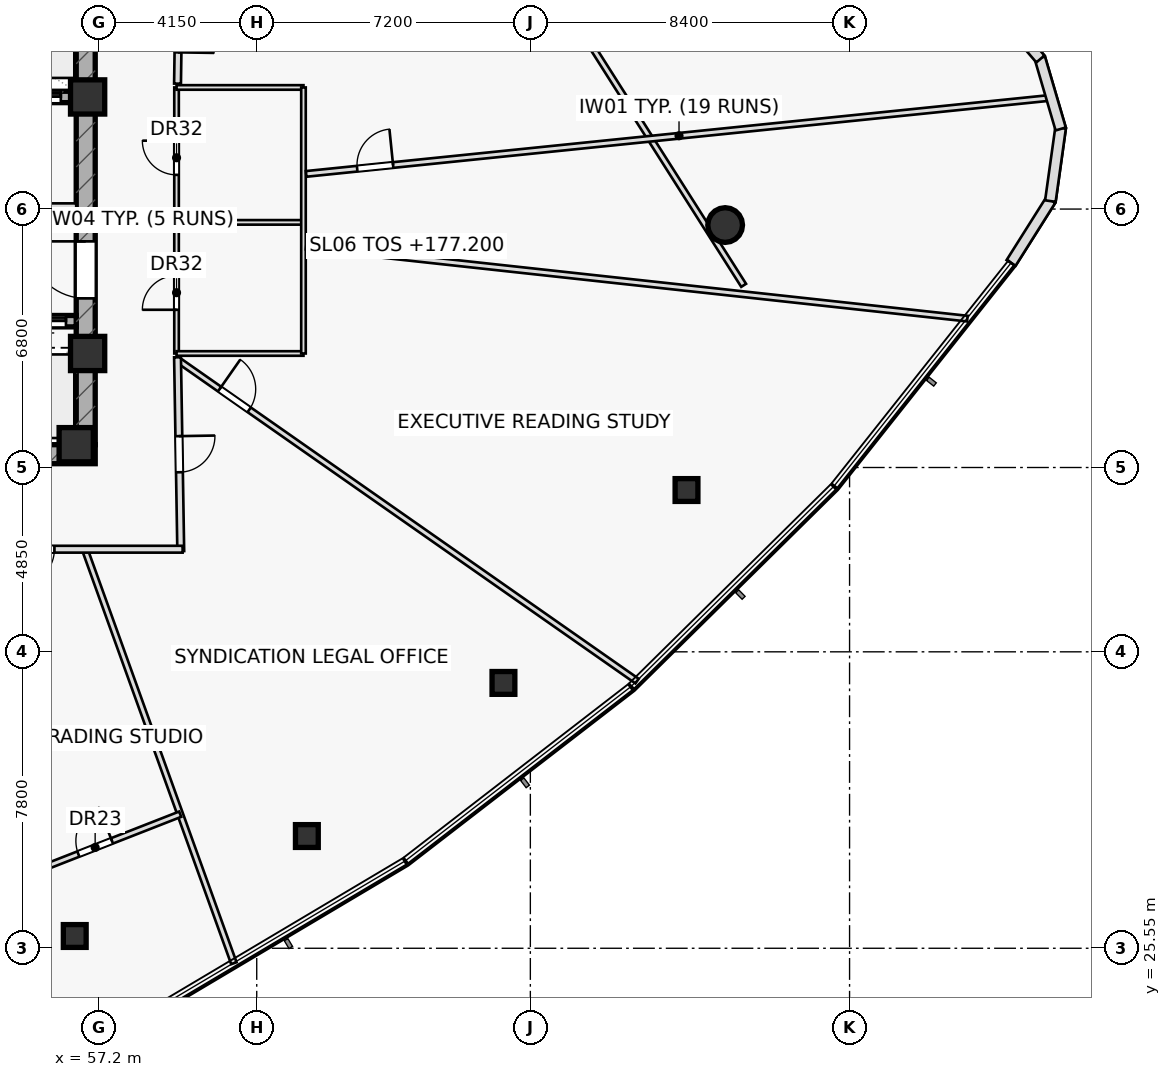
"""IFC4 building model, lengths in metres.
Left out: names, types, materials, properties, quantities, classifications, styles, units other than length and angle.
Written with IfcOpenShell. Run it as: python <this file> out.ifc"""

import sys

from ifc_helpers import new_model, si_unit, direction, frame, frame_2d, origin, origin_2d, place, context, subcontext, project, spatial, rectangle, hollow_rectangle, hollow_circle, extrude, element, fill, save


model = new_model("IFC4")
c1 = context("Model", 3, precision=1e-05, world=origin(), true_north=direction((0.0, 1.0)))
c2 = subcontext(c1, "Body", "Model", "MODEL_VIEW")
j1 = project(units=[si_unit("LENGTHUNIT", "METRE"), si_unit("PLANEANGLEUNIT", "RADIAN")], contexts=[c1])
p1 = place(None, origin())
s1 = spatial("IfcSite", under=j1, at=p1, CompositionType="ELEMENT")
p2 = place(p1, origin())
s2 = spatial("IfcBuilding", under=s1, at=p2, CompositionType="ELEMENT")
p3 = place(p2, frame((0.0, 0.0, 177.2)))
s3 = spatial("IfcBuildingStorey", under=s2, at=p3, CompositionType="ELEMENT", Elevation=177.2)
p4 = place(p3, frame((42.9, 38.55, 0.0), z_axis=(0.0, 0.0, 1.0), x_axis=(1.0, 0.0, 0.0)))
e1 = element("IfcWall", 1, at=p4, inside=s3, PredefinedType="SHEAR", context=c2, shape_type="SweptSolid", body=[
    extrude(rectangle(XDim=14.2, YDim=0.5, at=frame_2d((7.1, 0.0))), origin(), (0.0, 0.0, 1.0), 3.55),
])
p5 = place(p4, frame((0.78, 0.0, 0.0)))
e2 = element("IfcOpeningElement", 2, at=p5, cuts=e1, PredefinedType="OPENING", context=c2, shape_type="SweptSolid", body=[
    extrude(rectangle(XDim=1.05, YDim=2.2, at=frame_2d((0.525, 1.1))), frame((0.0, 0.26, 0.0), z_axis=(0.0, -1.0, 0.0), x_axis=(1.0, 0.0, 0.0)), (0.0, 0.0, 1.0), 0.52),
])
p6 = place(p3, frame((56.85, 38.8, 0.0), z_axis=(0.0, 0.0, 1.0), x_axis=(0.0, 1.0, 0.0)))
e3 = element("IfcWall", 3, at=p6, inside=s3, PredefinedType="SHEAR", context=c2, shape_type="SweptSolid", body=[
    extrude(rectangle(XDim=12.4, YDim=0.5, at=frame_2d((6.2, 0.0))), origin(), (0.0, 0.0, 1.0), 3.55),
])
p7 = place(p6, frame((3.85, 0.0, 0.0)))
e4 = element("IfcOpeningElement", 4, at=p7, cuts=e3, PredefinedType="OPENING", context=c2, shape_type="SweptSolid", body=[
    extrude(rectangle(XDim=1.5, YDim=2.2, at=frame_2d((0.75, 1.1))), frame((0.0, 0.26, 0.0), z_axis=(0.0, -1.0, 0.0), x_axis=(1.0, 0.0, 0.0)), (0.0, 0.0, 1.0), 0.52),
])
p8 = place(p3, frame((43.4, 47.95, 0.0), z_axis=(0.0, 0.0, 1.0), x_axis=(1.0, 0.0, 0.0)))
e5 = element("IfcWall", 5, at=p8, inside=s3, PredefinedType="SHEAR", context=c2, shape_type="SweptSolid", body=[
    extrude(rectangle(XDim=13.2, YDim=0.3, at=frame_2d((6.6, 0.0))), origin(), (0.0, 0.0, 1.0), 3.55),
])
p9 = place(p8, frame((8.345, 0.0, 0.0)))
e6 = element("IfcOpeningElement", 6, at=p9, cuts=e5, PredefinedType="OPENING", context=c2, shape_type="SweptSolid", body=[
    extrude(rectangle(XDim=1.15, YDim=2.2, at=frame_2d((0.575, 1.1))), frame((0.0, 0.16, 0.0), z_axis=(0.0, -1.0, 0.0), x_axis=(1.0, 0.0, 0.0)), (0.0, 0.0, 1.0), 0.32),
])
p10 = place(p8, frame((10.065, 0.0, 0.0)))
e7 = element("IfcOpeningElement", 7, at=p10, cuts=e5, PredefinedType="OPENING", context=c2, shape_type="SweptSolid", body=[
    extrude(rectangle(XDim=1.15, YDim=2.2, at=frame_2d((0.575, 1.1))), frame((0.0, 0.16, 0.0), z_axis=(0.0, -1.0, 0.0), x_axis=(1.0, 0.0, 0.0)), (0.0, 0.0, 1.0), 0.32),
])
p11 = place(p8, frame((11.645, 0.0, 0.0)))
e8 = element("IfcOpeningElement", 8, at=p11, cuts=e5, PredefinedType="OPENING", context=c2, shape_type="SweptSolid", body=[
    extrude(rectangle(XDim=1.15, YDim=2.2, at=frame_2d((0.575, 1.1))), frame((0.0, 0.16, 0.0), z_axis=(0.0, -1.0, 0.0), x_axis=(1.0, 0.0, 0.0)), (0.0, 0.0, 1.0), 0.32),
])
p12 = place(p3, frame((43.4, 42.05, 0.0), z_axis=(0.0, 0.0, 1.0), x_axis=(1.0, 0.0, 0.0)))
e9 = element("IfcWall", 9, at=p12, inside=s3, PredefinedType="SHEAR", context=c2, shape_type="SweptSolid", body=[
    extrude(rectangle(XDim=13.2, YDim=0.3, at=frame_2d((6.6, 0.0))), origin(), (0.0, 0.0, 1.0), 3.55),
])
p13 = place(p12, frame((8.37, 0.0, 0.0)))
e10 = element("IfcOpeningElement", 10, at=p13, cuts=e9, PredefinedType="OPENING", context=c2, shape_type="SweptSolid", body=[
    extrude(rectangle(XDim=1.1, YDim=2.15, at=frame_2d((0.55, 1.075))), frame((0.0, 0.16, 0.0), z_axis=(0.0, -1.0, 0.0), x_axis=(1.0, 0.0, 0.0)), (0.0, 0.0, 1.0), 0.32),
])
p14 = place(p12, frame((10.09, 0.0, 0.0)))
e11 = element("IfcOpeningElement", 11, at=p14, cuts=e9, PredefinedType="OPENING", context=c2, shape_type="SweptSolid", body=[
    extrude(rectangle(XDim=1.1, YDim=2.15, at=frame_2d((0.55, 1.075))), frame((0.0, 0.16, 0.0), z_axis=(0.0, -1.0, 0.0), x_axis=(1.0, 0.0, 0.0)), (0.0, 0.0, 1.0), 0.32),
])
p15 = place(p12, frame((11.83, 0.0, 0.0)))
e12 = element("IfcOpeningElement", 12, at=p15, cuts=e9, PredefinedType="OPENING", context=c2, shape_type="SweptSolid", body=[
    extrude(rectangle(XDim=1.1, YDim=2.15, at=frame_2d((0.55, 1.075))), frame((0.0, 0.16, 0.0), z_axis=(0.0, -1.0, 0.0), x_axis=(1.0, 0.0, 0.0)), (0.0, 0.0, 1.0), 0.32),
])
for number, where, z_axis, x_axis in (
    (13, (56.9, 47.95, 0.0), (0.0, 0.0, 1.0), (1.0, 0.0, 0.0)),
    (14, (56.9, 41.2, 0.0), (0.0, 0.0, 1.0), (1.0, 0.0, 0.0)),
    (15, (56.6, 38.8, 0.0), (0.0, 0.0, 1.0), (1.0, 0.0, 0.0)),
):
    element("IfcColumn", number, at=place(p3, frame(where, z_axis=z_axis, x_axis=x_axis)), inside=s3, PredefinedType="COLUMN", context=c2, shape_type="SweptSolid", body=[
        extrude(rectangle(XDim=0.9, YDim=0.9, at=origin_2d()), origin(), (0.0, 0.0, 1.0), 3.55),
    ])
for number, where, z_axis, x_axis in (
    (16, (56.561, 25.873, 0.0), (0.0, 0.0, 1.0), (1.0, 0.0, 0.0)),
    (17, (62.669, 28.503, 0.0), (0.0, 0.0, 1.0), (1.0, 0.0, 0.0)),
    (18, (67.842, 32.532, 0.0), (0.0, 0.0, 1.0), (1.0, 0.0, 0.0)),
    (19, (72.659, 37.607, 0.0), (0.0, 0.0, 1.0), (1.0, 0.0, 0.0)),
):
    element("IfcColumn", number, at=place(p3, frame(where, z_axis=z_axis, x_axis=x_axis)), inside=s3, PredefinedType="COLUMN", context=c2, shape_type="SweptSolid", body=[
        extrude(hollow_rectangle(XDim=0.6, YDim=0.6, WallThickness=0.036, at=origin_2d()), origin(), (0.0, 0.0, 1.0), 3.55),
    ])
p16 = place(p3, frame((73.676, 44.58, 0.0), z_axis=(0.0, 0.0, 1.0), x_axis=(1.0, 0.0, 0.0)))
e20 = element("IfcColumn", 20, at=p16, inside=s3, PredefinedType="COLUMN", context=c2, shape_type="SweptSolid", body=[
    extrude(hollow_circle(Radius=0.457, WallThickness=0.04, at=origin_2d()), origin(), (0.0, 0.0, 1.0), 3.55),
])
p17 = place(p3, frame((50.65, 45.05, 0.0), z_axis=(0.0, 0.0, 1.0), x_axis=(1.0, 0.0, 0.0)))
e21 = element("IfcWall", 21, at=p17, inside=s3, PredefinedType="PARTITIONING", context=c2, shape_type="SweptSolid", body=[
    extrude(rectangle(XDim=5.95, YDim=0.2, at=frame_2d((2.975, 0.0))), origin(), (0.0, 0.0, 1.0), 3.55),
])
p18 = place(p17, frame((1.35, 0.0, 0.0)))
e22 = element("IfcOpeningElement", 22, at=p18, cuts=e21, PredefinedType="OPENING", context=c2, shape_type="SweptSolid", body=[
    extrude(rectangle(XDim=1.5, YDim=2.2, at=frame_2d((0.75, 1.1))), frame((0.0, 0.11, 0.0), z_axis=(0.0, -1.0, 0.0), x_axis=(1.0, 0.0, 0.0)), (0.0, 0.0, 1.0), 0.22),
])
p19 = place(p3, frame((74.163, 42.993, 0.0), z_axis=(0.0, 0.0, 1.0), x_axis=(-0.53628142437, 0.844039237166, 0.0)))
e23 = element("IfcWall", 23, at=p19, inside=s3, PredefinedType="PARTITIONING", context=c2, shape_type="SweptSolid", body=[
    extrude(rectangle(XDim=10.267, YDim=0.15, at=frame_2d((5.133, 0.0))), origin(), (0.0, 0.0, 1.0), 2.935),
])
p20 = place(p3, frame((59.24, 41.2, 0.0), z_axis=(0.0, 0.0, 1.0), x_axis=(0.0, 1.0, 0.0)))
e24 = element("IfcWall", 24, at=p20, inside=s3, PredefinedType="PARTITIONING", context=c2, shape_type="SweptSolid", body=[
    extrude(rectangle(XDim=7.0, YDim=0.12, at=frame_2d((3.5, 0.0))), origin(), (0.0, 0.0, 1.0), 3.55),
])
p21 = place(p20, frame((1.15, 0.0, 0.0)))
e25 = element("IfcOpeningElement", 25, at=p21, cuts=e24, PredefinedType="OPENING", context=c2, shape_type="SweptSolid", body=[
    extrude(rectangle(XDim=0.9, YDim=2.05, at=frame_2d((0.45, 1.025))), frame((0.0, 0.07, 0.0), z_axis=(0.0, -1.0, 0.0), x_axis=(1.0, 0.0, 0.0)), (0.0, 0.0, 1.0), 0.14),
])
p22 = place(p20, frame((4.7, 0.0, 0.0)))
e26 = element("IfcOpeningElement", 26, at=p22, cuts=e24, PredefinedType="OPENING", context=c2, shape_type="SweptSolid", body=[
    extrude(rectangle(XDim=0.9, YDim=2.05, at=frame_2d((0.45, 1.025))), frame((0.0, 0.07, 0.0), z_axis=(0.0, -1.0, 0.0), x_axis=(1.0, 0.0, 0.0)), (0.0, 0.0, 1.0), 0.14),
])
for number, where, z_axis, x_axis in (
    (27, (59.24, 41.2, 0.0), (0.0, 0.0, 1.0), (1.0, 0.0, 0.0)),
    (28, (59.24, 44.65, 0.0), (0.0, 0.0, 1.0), (1.0, 0.0, 0.0)),
    (29, (59.24, 48.2, 0.0), (0.0, 0.0, 1.0), (1.0, 0.0, 0.0)),
):
    element("IfcWall", number, at=place(p3, frame(where, z_axis=z_axis, x_axis=x_axis)), inside=s3, PredefinedType="PARTITIONING", context=c2, shape_type="SweptSolid", body=[
        extrude(rectangle(XDim=3.34, YDim=0.12, at=frame_2d((1.67, 0.0))), origin(), (0.0, 0.0, 1.0), 3.55),
    ])
p23 = place(p3, frame((62.58, 41.2, 0.0), z_axis=(0.0, 0.0, 1.0), x_axis=(0.0, 1.0, 0.0)))
e30 = element("IfcWall", 30, at=p23, inside=s3, PredefinedType="PARTITIONING", context=c2, shape_type="SweptSolid", body=[
    extrude(rectangle(XDim=7.0, YDim=0.12, at=frame_2d((3.5, 0.0))), origin(), (0.0, 0.0, 1.0), 3.55),
])
p24 = place(p3, frame((56.824, 36.05, 0.0), z_axis=(0.0, 0.0, 1.0), x_axis=(0.338939715527, -0.940808093736, 0.0)))
e31 = element("IfcWall", 31, at=p24, inside=s3, PredefinedType="PARTITIONING", context=c2, shape_type="SweptSolid", body=[
    extrude(rectangle(XDim=11.579, YDim=0.15, at=frame_2d((5.79, 0.0))), origin(), (0.0, 0.0, 1.0), 2.935),
])
p25 = place(p3, frame((59.267, 41.037, 0.0), z_axis=(0.0, 0.0, 1.0), x_axis=(0.819456500976, -0.573141381344, 0.0)))
e32 = element("IfcWall", 32, at=p25, inside=s3, PredefinedType="PARTITIONING", context=c2, shape_type="SweptSolid", body=[
    extrude(rectangle(XDim=14.756, YDim=0.15, at=frame_2d((7.378, 0.0))), origin(), (0.0, 0.0, 1.0), 2.935),
])
p26 = place(p25, frame((1.35, 0.0, 0.0)))
e33 = element("IfcOpeningElement", 33, at=p26, cuts=e32, PredefinedType="OPENING", context=c2, shape_type="SweptSolid", body=[
    extrude(rectangle(XDim=0.95, YDim=2.05, at=frame_2d((0.475, 1.025))), frame((0.0, 0.085, 0.0), z_axis=(0.0, -1.0, 0.0), x_axis=(1.0, 0.0, 0.0)), (0.0, 0.0, 1.0), 0.17),
])
p27 = place(p3, frame((62.65, 44.014, 0.0), z_axis=(0.0, 0.0, 1.0), x_axis=(0.994112397919, -0.108353773829, 0.0)))
e34 = element("IfcWall", 34, at=p27, inside=s3, PredefinedType="PARTITIONING", context=c2, shape_type="SweptSolid", body=[
    extrude(rectangle(XDim=17.503, YDim=0.15, at=frame_2d((8.751, 0.0))), origin(), (0.0, 0.0, 1.0), 2.935),
])
p28 = place(p3, frame((62.65, 45.925, 0.0), z_axis=(0.0, 0.0, 1.0), x_axis=(0.994818188215, 0.10166991884, 0.0)))
e35 = element("IfcWall", 35, at=p28, inside=s3, PredefinedType="PARTITIONING", context=c2, shape_type="SweptSolid", body=[
    extrude(rectangle(XDim=19.727, YDim=0.15, at=frame_2d((9.863, 0.0))), origin(), (0.0, 0.0, 1.0), 3.025),
])
p29 = place(p28, frame((1.35, 0.0, 0.0)))
e36 = element("IfcOpeningElement", 36, at=p29, cuts=e35, PredefinedType="OPENING", context=c2, shape_type="SweptSolid", body=[
    extrude(rectangle(XDim=0.95, YDim=2.05, at=frame_2d((0.475, 1.025))), frame((0.0, 0.085, 0.0), z_axis=(0.0, -1.0, 0.0), x_axis=(1.0, 0.0, 0.0)), (0.0, 0.0, 1.0), 0.17),
])
p30 = place(p3, frame((54.861, 27.326, 0.0), z_axis=(0.0, 0.0, 1.0), x_axis=(0.931173811316, 0.364575552005, 0.0)))
e37 = element("IfcWall", 37, at=p30, inside=s3, PredefinedType="PARTITIONING", context=c2, shape_type="SweptSolid", body=[
    extrude(rectangle(XDim=4.806, YDim=0.15, at=frame_2d((2.403, 0.0))), origin(), (0.0, 0.0, 1.0), 2.935),
])
p31 = place(p30, frame((1.928, 0.0, 0.0)))
e38 = element("IfcOpeningElement", 38, at=p31, cuts=e37, PredefinedType="OPENING", context=c2, shape_type="SweptSolid", body=[
    extrude(rectangle(XDim=0.95, YDim=2.05, at=frame_2d((0.475, 1.025))), frame((0.0, 0.085, 0.0), z_axis=(0.0, -1.0, 0.0), x_axis=(1.0, 0.0, 0.0)), (0.0, 0.0, 1.0), 0.17),
])
p32 = place(p3, frame((59.351, 54.0, 0.0), z_axis=(0.0, 0.0, 1.0), x_axis=(-0.014903899768, -0.999888930718, 0.0)))
e39 = element("IfcWall", 39, at=p32, inside=s3, PredefinedType="PARTITIONING", context=c2, shape_type="SweptSolid", body=[
    extrude(rectangle(XDim=5.701, YDim=0.18, at=frame_2d((2.85, 0.0))), origin(), (0.0, 0.0, 1.0), 2.935),
])
p33 = place(p32, frame((1.292, 0.0, 0.0)))
e40 = element("IfcOpeningElement", 40, at=p33, cuts=e39, PredefinedType="OPENING", context=c2, shape_type="SweptSolid", body=[
    extrude(rectangle(XDim=0.95, YDim=2.05, at=frame_2d((0.475, 1.025))), frame((0.0, 0.1, 0.0), z_axis=(0.0, -1.0, 0.0), x_axis=(1.0, 0.0, 0.0)), (0.0, 0.0, 1.0), 0.2),
])
p34 = place(p32, frame((3.927, 0.0, 0.0)))
e41 = element("IfcOpeningElement", 41, at=p34, cuts=e39, PredefinedType="OPENING", context=c2, shape_type="SweptSolid", body=[
    extrude(rectangle(XDim=0.95, YDim=2.05, at=frame_2d((0.475, 1.025))), frame((0.0, 0.1, 0.0), z_axis=(0.0, -1.0, 0.0), x_axis=(1.0, 0.0, 0.0)), (0.0, 0.0, 1.0), 0.2),
])
p35 = place(p3, frame((59.266, 41.1, 0.0), z_axis=(0.0, 0.0, 1.0), x_axis=(0.016656377357, -0.999861272924, 0.0)))
e42 = element("IfcWall", 42, at=p35, inside=s3, PredefinedType="PARTITIONING", context=c2, shape_type="SweptSolid", body=[
    extrude(rectangle(XDim=5.101, YDim=0.18, at=frame_2d((2.55, 0.0))), origin(), (0.0, 0.0, 1.0), 2.935),
])
p36 = place(p35, frame((2.075, 0.0, 0.0)))
e43 = element("IfcOpeningElement", 43, at=p36, cuts=e42, PredefinedType="OPENING", context=c2, shape_type="SweptSolid", body=[
    extrude(rectangle(XDim=0.95, YDim=2.05, at=frame_2d((0.475, 1.025))), frame((0.0, 0.1, 0.0), z_axis=(0.0, -1.0, 0.0), x_axis=(1.0, 0.0, 0.0)), (0.0, 0.0, 1.0), 0.2),
])
p37 = place(p3, frame((59.4, 36.05, 0.0), z_axis=(0.0, 0.0, 1.0), x_axis=(-1.0, 0.0, 0.0)))
e44 = element("IfcWall", 44, at=p37, inside=s3, PredefinedType="PARTITIONING", context=c2, shape_type="SweptSolid", body=[
    extrude(rectangle(XDim=19.65, YDim=0.18, at=frame_2d((9.825, 0.0))), origin(), (0.0, 0.0, 1.0), 2.935),
])
p38 = place(p37, frame((3.374, 0.0, 0.0)))
e45 = element("IfcOpeningElement", 45, at=p38, cuts=e44, PredefinedType="OPENING", context=c2, shape_type="SweptSolid", body=[
    extrude(rectangle(XDim=0.95, YDim=2.05, at=frame_2d((0.475, 1.025))), frame((0.0, 0.1, 0.0), z_axis=(0.0, -1.0, 0.0), x_axis=(1.0, 0.0, 0.0)), (0.0, 0.0, 1.0), 0.2),
])
p39 = place(p37, frame((7.369, 0.0, 0.0)))
e46 = element("IfcOpeningElement", 46, at=p39, cuts=e44, PredefinedType="OPENING", context=c2, shape_type="SweptSolid", body=[
    extrude(rectangle(XDim=0.95, YDim=2.05, at=frame_2d((0.475, 1.025))), frame((0.0, 0.1, 0.0), z_axis=(0.0, -1.0, 0.0), x_axis=(1.0, 0.0, 0.0)), (0.0, 0.0, 1.0), 0.2),
])
p40 = place(p37, frame((13.957, 0.0, 0.0)))
e47 = element("IfcOpeningElement", 47, at=p40, cuts=e44, PredefinedType="OPENING", context=c2, shape_type="SweptSolid", body=[
    extrude(rectangle(XDim=0.95, YDim=2.05, at=frame_2d((0.475, 1.025))), frame((0.0, 0.1, 0.0), z_axis=(0.0, -1.0, 0.0), x_axis=(1.0, 0.0, 0.0)), (0.0, 0.0, 1.0), 0.2),
])
p41 = place(p3, frame((81.2, 43.582, 0.0), z_axis=(0.0, 0.0, 1.0), x_axis=(0.533570590972, 0.845755534685, 0.0)))
e48 = element("IfcWall", 48, at=p41, inside=s3, PredefinedType="STANDARD", context=c2, shape_type="SweptSolid", body=[
    extrude(rectangle(XDim=1.958, YDim=0.28, at=frame_2d((0.979, 0.0))), origin(), (0.0, 0.0, 1.0), 3.55),
])
for number, where, z_axis, x_axis in (
    (49, (82.234, 45.21, 0.0), (0.0, 0.0, 1.0), (0.138, 0.99, 0.0)),
    (50, (82.505, 47.108, 0.0), (0.0, 0.0, 1.0), (-0.282, 0.96, 0.0)),
):
    element("IfcWall", number, at=place(p3, frame(where, z_axis=z_axis, x_axis=x_axis)), inside=s3, PredefinedType="STANDARD", context=c2, shape_type="SweptSolid", body=[
        extrude(rectangle(XDim=1.946, YDim=0.28, at=frame_2d((0.973, 0.0))), origin(), (0.0, 0.0, 1.0), 3.55),
    ])
p42 = place(p3, frame((81.972, 48.949, 0.0), z_axis=(0.0, 0.0, 1.0), x_axis=(-0.651424448018, 0.758713508859, 0.0)))
e51 = element("IfcWall", 51, at=p42, inside=s3, PredefinedType="STANDARD", context=c2, shape_type="SweptSolid", body=[
    extrude(rectangle(XDim=1.968, YDim=0.28, at=frame_2d((0.984, 0.0))), origin(), (0.0, 0.0, 1.0), 3.55),
])
p43 = place(p7, origin())
e52 = element("IfcDoor", 52, at=p43, inside=s3, OperationType="SINGLE_SWING_RIGHT", PredefinedType="DOOR", context=c2, shape_type="SweptSolid", body=[
    extrude(rectangle(XDim=1.5, YDim=2.2, at=frame_2d((0.75, 1.1))), frame((0.0, 0.025, 0.0), z_axis=(0.0, -1.0, 0.0), x_axis=(1.0, 0.0, 0.0)), (0.0, 0.0, 1.0), 0.05),
])
fill(e4, e52)
p44 = place(p21, origin())
e53 = element("IfcDoor", 53, at=p44, inside=s3, OperationType="SINGLE_SWING_LEFT", PredefinedType="DOOR", context=c2, shape_type="SweptSolid", body=[
    extrude(rectangle(XDim=0.9, YDim=2.05, at=frame_2d((0.45, 1.025))), frame((0.0, 0.025, 0.0), z_axis=(0.0, -1.0, 0.0), x_axis=(1.0, 0.0, 0.0)), (0.0, 0.0, 1.0), 0.05),
])
fill(e25, e53)
p45 = place(p22, origin())
e54 = element("IfcDoor", 54, at=p45, inside=s3, OperationType="SINGLE_SWING_RIGHT", PredefinedType="DOOR", context=c2, shape_type="SweptSolid", body=[
    extrude(rectangle(XDim=0.9, YDim=2.05, at=frame_2d((0.45, 1.025))), frame((0.0, 0.025, 0.0), z_axis=(0.0, -1.0, 0.0), x_axis=(1.0, 0.0, 0.0)), (0.0, 0.0, 1.0), 0.05),
])
fill(e26, e54)
p46 = place(p26, origin())
e55 = element("IfcDoor", 55, at=p46, inside=s3, OperationType="SINGLE_SWING_LEFT", PredefinedType="DOOR", context=c2, shape_type="SweptSolid", body=[
    extrude(rectangle(XDim=0.95, YDim=2.05, at=frame_2d((0.475, 1.025))), frame((0.0, 0.025, 0.0), z_axis=(0.0, -1.0, 0.0), x_axis=(1.0, 0.0, 0.0)), (0.0, 0.0, 1.0), 0.05),
])
fill(e33, e55)
p47 = place(p29, origin())
e56 = element("IfcDoor", 56, at=p47, inside=s3, OperationType="SINGLE_SWING_RIGHT", PredefinedType="DOOR", context=c2, shape_type="SweptSolid", body=[
    extrude(rectangle(XDim=0.95, YDim=2.05, at=frame_2d((0.475, 1.025))), frame((0.0, 0.025, 0.0), z_axis=(0.0, -1.0, 0.0), x_axis=(1.0, 0.0, 0.0)), (0.0, 0.0, 1.0), 0.05),
])
fill(e36, e56)
p48 = place(p31, origin())
e57 = element("IfcDoor", 57, at=p48, inside=s3, OperationType="SINGLE_SWING_RIGHT", PredefinedType="DOOR", context=c2, shape_type="SweptSolid", body=[
    extrude(rectangle(XDim=0.95, YDim=2.05, at=frame_2d((0.475, 1.025))), frame((0.0, 0.025, 0.0), z_axis=(0.0, -1.0, 0.0), x_axis=(1.0, 0.0, 0.0)), (0.0, 0.0, 1.0), 0.05),
])
fill(e38, e57)
p49 = place(p34, origin())
e58 = element("IfcDoor", 58, at=p49, inside=s3, OperationType="SINGLE_SWING_RIGHT", PredefinedType="DOOR", context=c2, shape_type="SweptSolid", body=[
    extrude(rectangle(XDim=0.95, YDim=2.05, at=frame_2d((0.475, 1.025))), frame((0.0, 0.025, 0.0), z_axis=(0.0, -1.0, 0.0), x_axis=(1.0, 0.0, 0.0)), (0.0, 0.0, 1.0), 0.05),
])
fill(e41, e58)
p50 = place(p36, origin())
e59 = element("IfcDoor", 59, at=p50, inside=s3, OperationType="SINGLE_SWING_LEFT", PredefinedType="DOOR", context=c2, shape_type="SweptSolid", body=[
    extrude(rectangle(XDim=0.95, YDim=2.05, at=frame_2d((0.475, 1.025))), frame((0.0, 0.025, 0.0), z_axis=(0.0, -1.0, 0.0), x_axis=(1.0, 0.0, 0.0)), (0.0, 0.0, 1.0), 0.05),
])
fill(e43, e59)
p51 = place(p38, origin())
e60 = element("IfcDoor", 60, at=p51, inside=s3, OperationType="SINGLE_SWING_RIGHT", PredefinedType="DOOR", context=c2, shape_type="SweptSolid", body=[
    extrude(rectangle(XDim=0.95, YDim=2.05, at=frame_2d((0.475, 1.025))), frame((0.0, 0.025, 0.0), z_axis=(0.0, -1.0, 0.0), x_axis=(1.0, 0.0, 0.0)), (0.0, 0.0, 1.0), 0.05),
])
fill(e45, e60)
p52 = place(p11, origin())
e61 = element("IfcDoor", 61, at=p52, inside=s3, OperationType="SLIDING_TO_LEFT", PredefinedType="DOOR", context=c2, shape_type="SweptSolid", body=[
    extrude(rectangle(XDim=1.15, YDim=2.2, at=frame_2d((0.575, 1.1))), frame((0.0, 0.025, 0.0), z_axis=(0.0, -1.0, 0.0), x_axis=(1.0, 0.0, 0.0)), (0.0, 0.0, 1.0), 0.05),
])
fill(e8, e61)
p53 = place(p15, origin())
e62 = element("IfcDoor", 62, at=p53, inside=s3, OperationType="SLIDING_TO_LEFT", PredefinedType="DOOR", context=c2, shape_type="SweptSolid", body=[
    extrude(rectangle(XDim=1.1, YDim=2.15, at=frame_2d((0.55, 1.075))), frame((0.0, 0.025, 0.0), z_axis=(0.0, -1.0, 0.0), x_axis=(1.0, 0.0, 0.0)), (0.0, 0.0, 1.0), 0.05),
])
fill(e12, e62)
save(model, sys.argv[1])
